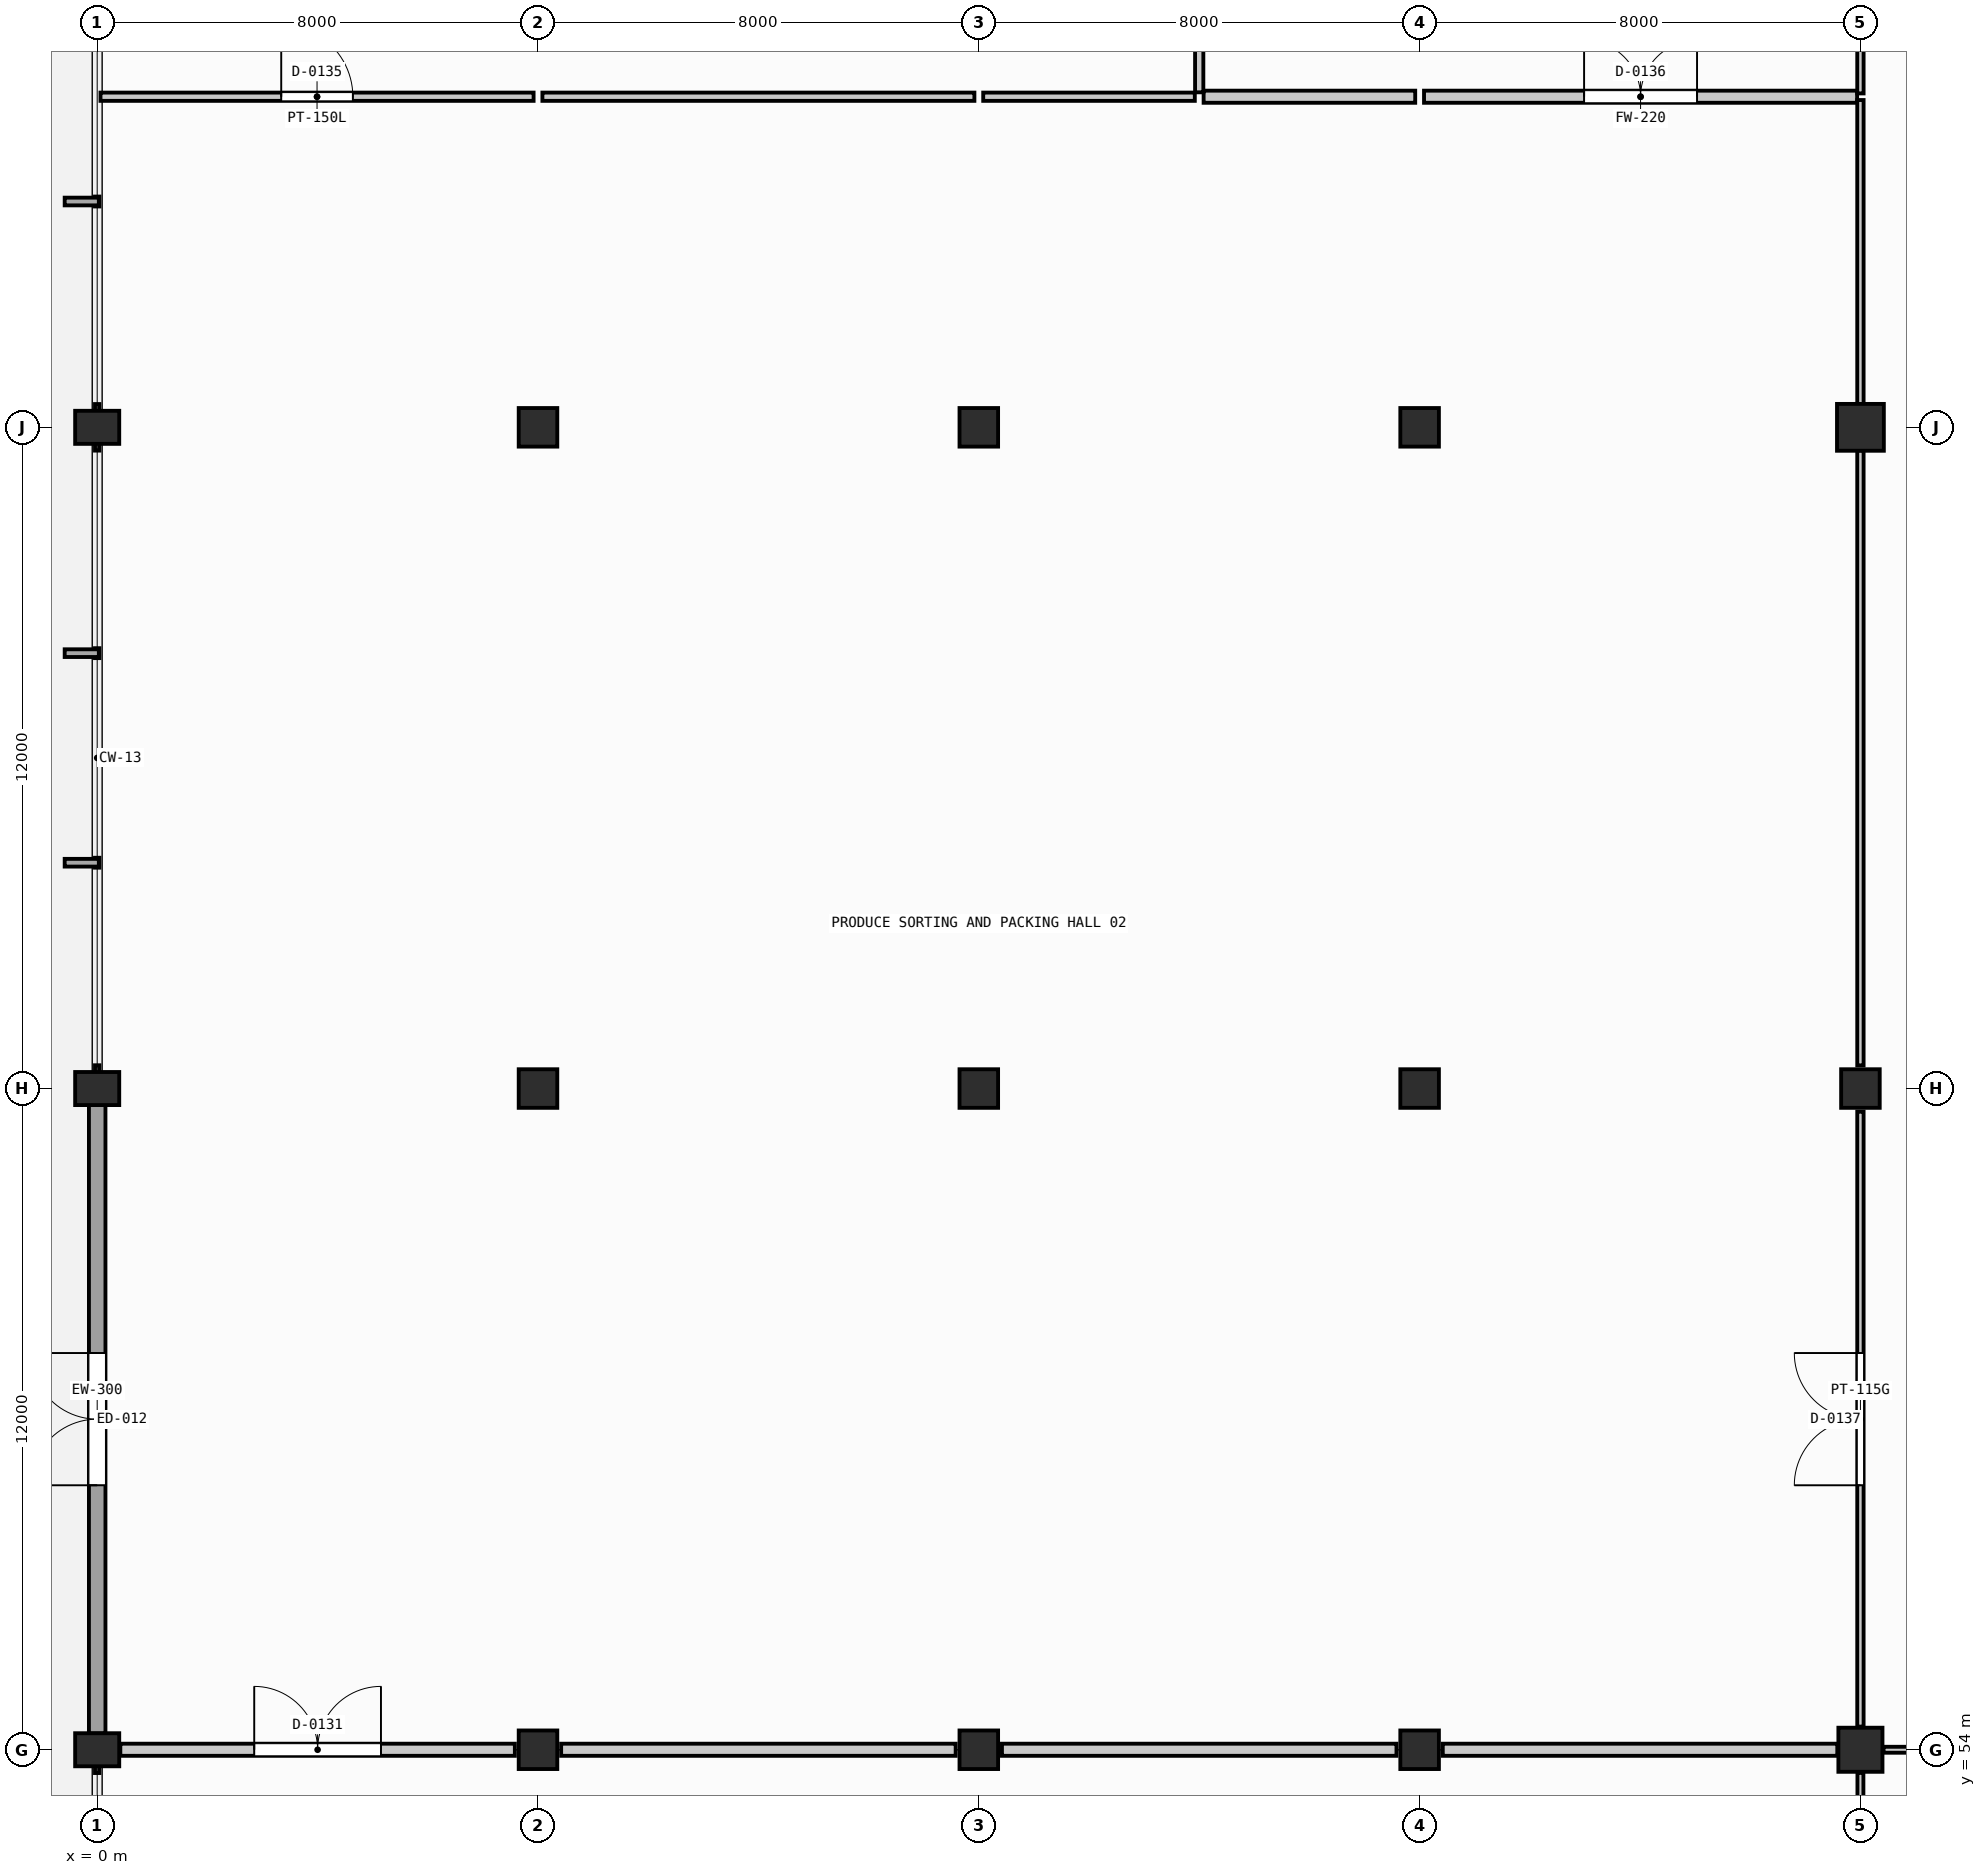
"""IFC4 building model, lengths in metres.
Left out: names, types, materials, properties, quantities, classifications, styles, units other than length and angle.
Written with IfcOpenShell. Run it as: python <this file> out.ifc"""

import sys

from ifc_helpers import new_model, si_unit, direction, frame, frame_2d, origin, origin_2d, place, context, subcontext, project, spatial, rectangle, extrude, element, fill, save


model = new_model("IFC4")
c1 = context("Model", 3, precision=1e-05, world=origin(), true_north=direction((0.0, 1.0)))
c2 = subcontext(c1, "Body", "Model", "MODEL_VIEW")
j1 = project(units=[si_unit("LENGTHUNIT", "METRE"), si_unit("PLANEANGLEUNIT", "RADIAN")], contexts=[c1])
p1 = place(None, origin())
s1 = spatial("IfcSite", under=j1, at=p1, CompositionType="ELEMENT")
p2 = place(p1, origin())
s2 = spatial("IfcBuilding", under=s1, at=p2, CompositionType="ELEMENT")
p3 = place(p2, origin())
s3 = spatial("IfcBuildingStorey", under=s2, at=p3, CompositionType="ELEMENT", Elevation=0.0)
for number, where, z_axis, x_axis in (
    (1, (0.0, 54.0, -1.25), (0.0, 0.0, 1.0), (1.0, 0.0, 0.0)),
    (2, (0.0, 66.0, -1.25), (0.0, 0.0, 1.0), (1.0, 0.0, 0.0)),
    (3, (0.0, 78.0, -1.25), (0.0, 0.0, 1.0), (1.0, 0.0, 0.0)),
):
    element("IfcColumn", number, at=place(p3, frame(where, z_axis=z_axis, x_axis=x_axis)), inside=s3, PredefinedType="COLUMN", context=c2, shape_type="SweptSolid", body=[
        extrude(rectangle(XDim=0.8, YDim=0.6, at=origin_2d()), origin(), (0.0, 0.0, 1.0), 6.05),
    ])
for number, where, z_axis, x_axis in (
    (4, (8.0, 54.0, -1.25), (0.0, 0.0, 1.0), (1.0, 0.0, 0.0)),
    (5, (8.0, 66.0, -1.25), (0.0, 0.0, 1.0), (1.0, 0.0, 0.0)),
    (6, (8.0, 78.0, -1.25), (0.0, 0.0, 1.0), (1.0, 0.0, 0.0)),
    (7, (16.0, 54.0, -1.25), (0.0, 0.0, 1.0), (1.0, 0.0, 0.0)),
    (8, (16.0, 66.0, -1.25), (0.0, 0.0, 1.0), (1.0, 0.0, 0.0)),
    (9, (16.0, 78.0, -1.25), (0.0, 0.0, 1.0), (1.0, 0.0, 0.0)),
    (10, (24.0, 54.0, -1.25), (0.0, 0.0, 1.0), (1.0, 0.0, 0.0)),
    (11, (24.0, 66.0, -1.25), (0.0, 0.0, 1.0), (1.0, 0.0, 0.0)),
    (12, (24.0, 78.0, -1.25), (0.0, 0.0, 1.0), (1.0, 0.0, 0.0)),
):
    element("IfcColumn", number, at=place(p3, frame(where, z_axis=z_axis, x_axis=x_axis)), inside=s3, PredefinedType="COLUMN", context=c2, shape_type="SweptSolid", body=[
        extrude(rectangle(XDim=0.7, YDim=0.7, at=origin_2d()), origin(), (0.0, 0.0, 1.0), 6.05),
    ])
p4 = place(p3, frame((32.0, 54.0, -1.25), z_axis=(0.0, 0.0, 1.0), x_axis=(1.0, 0.0, 0.0)))
e13 = element("IfcColumn", 13, at=p4, inside=s3, PredefinedType="COLUMN", context=c2, shape_type="SweptSolid", body=[
    extrude(rectangle(XDim=0.8, YDim=0.8, at=origin_2d()), origin(), (0.0, 0.0, 1.0), 6.05),
])
p5 = place(p3, frame((32.0, 66.0, -1.25), z_axis=(0.0, 0.0, 1.0), x_axis=(1.0, 0.0, 0.0)))
e14 = element("IfcColumn", 14, at=p5, inside=s3, PredefinedType="COLUMN", context=c2, shape_type="SweptSolid", body=[
    extrude(rectangle(XDim=0.7, YDim=0.7, at=origin_2d()), origin(), (0.0, 0.0, 1.0), 6.05),
])
p6 = place(p3, frame((32.0, 78.0, -1.25), z_axis=(0.0, 0.0, 1.0), x_axis=(1.0, 0.0, 0.0)))
e15 = element("IfcColumn", 15, at=p6, inside=s3, PredefinedType="COLUMN", context=c2, shape_type="SweptSolid", body=[
    extrude(rectangle(XDim=0.85, YDim=0.85, at=origin_2d()), origin(), (0.0, 0.0, 1.0), 6.05),
])
p7 = place(p3, frame((0.0, 65.705, 0.0), z_axis=(0.0, 0.0, 1.0), x_axis=(0.0, -1.0, 0.0)))
e16 = element("IfcWall", 16, at=p7, inside=s3, PredefinedType="SOLIDWALL", context=c2, shape_type="SweptSolid", body=[
    extrude(rectangle(XDim=11.41, YDim=0.3, at=frame_2d((5.705, 0.0))), origin(), (0.0, 0.0, 1.0), 3.65),
])
p8 = place(p7, frame((4.505, 0.0, 0.0)))
e17 = element("IfcOpeningElement", 17, at=p8, cuts=e16, PredefinedType="OPENING", context=c2, shape_type="SweptSolid", body=[
    extrude(rectangle(XDim=2.4, YDim=2.3, at=frame_2d((1.2, 1.15))), frame((0.0, 0.16, 0.0), z_axis=(0.0, -1.0, 0.0), x_axis=(1.0, 0.0, 0.0)), (0.0, 0.0, 1.0), 0.32),
])
p9 = place(p3, frame((0.42, 54.0, 0.0), z_axis=(0.0, 0.0, 1.0), x_axis=(1.0, 0.0, 0.0)))
e18 = element("IfcWall", 18, at=p9, inside=s3, PredefinedType="SOLIDWALL", context=c2, shape_type="SweptSolid", body=[
    extrude(rectangle(XDim=7.16, YDim=0.22, at=frame_2d((3.58, 0.0))), origin(), (0.0, 0.0, 1.0), 3.65),
])
p10 = place(p9, frame((2.43, 0.0, 0.0)))
e19 = element("IfcOpeningElement", 19, at=p10, cuts=e18, PredefinedType="OPENING", context=c2, shape_type="SweptSolid", body=[
    extrude(rectangle(XDim=2.3, YDim=2.5, at=frame_2d((1.15, 1.25))), frame((0.0, 0.12, 0.0), z_axis=(0.0, -1.0, 0.0), x_axis=(1.0, 0.0, 0.0)), (0.0, 0.0, 1.0), 0.24),
])
for number, where, z_axis, x_axis in (
    (20, (8.42, 54.0, 0.0), (0.0, 0.0, 1.0), (1.0, 0.0, 0.0)),
    (21, (16.42, 54.0, 0.0), (0.0, 0.0, 1.0), (1.0, 0.0, 0.0)),
    (22, (24.42, 54.0, 0.0), (0.0, 0.0, 1.0), (1.0, 0.0, 0.0)),
):
    element("IfcWall", number, at=place(p3, frame(where, z_axis=z_axis, x_axis=x_axis)), inside=s3, PredefinedType="SOLIDWALL", context=c2, shape_type="SweptSolid", body=[
        extrude(rectangle(XDim=7.16, YDim=0.22, at=frame_2d((3.58, 0.0))), origin(), (0.0, 0.0, 1.0), 3.65),
    ])
p11 = place(p3, frame((32.0, 45.42, 0.0), z_axis=(0.0, 0.0, 1.0), x_axis=(0.0, 1.0, 0.0)))
e23 = element("IfcWall", 23, at=p11, inside=s3, PredefinedType="PARTITIONING", context=c2, shape_type="SweptSolid", body=[
    extrude(rectangle(XDim=8.16, YDim=0.108, at=frame_2d((4.08, 0.0))), origin(), (0.0, 0.0, 1.0), 3.65),
])
p12 = place(p11, frame((3.005, 0.0, 0.0)))
e24 = element("IfcOpeningElement", 24, at=p12, cuts=e23, PredefinedType="OPENING", context=c2, shape_type="SweptSolid", body=[
    extrude(rectangle(XDim=2.15, YDim=2.35, at=frame_2d((1.075, 1.175))), frame((0.0, 0.064, 0.0), z_axis=(0.0, -1.0, 0.0), x_axis=(1.0, 0.0, 0.0)), (0.0, 0.0, 1.0), 0.128),
])
p13 = place(p3, frame((0.06, 84.0, 0.0), z_axis=(0.0, 0.0, 1.0), x_axis=(1.0, 0.0, 0.0)))
e25 = element("IfcWall", 25, at=p13, inside=s3, PredefinedType="PARTITIONING", context=c2, shape_type="SweptSolid", body=[
    extrude(rectangle(XDim=7.86, YDim=0.15, at=frame_2d((3.93, 0.0))), origin(), (0.0, 0.0, 1.0), 3.65),
])
p14 = place(p13, frame((3.28, 0.0, 0.0)))
e26 = element("IfcOpeningElement", 26, at=p14, cuts=e25, PredefinedType="OPENING", context=c2, shape_type="SweptSolid", body=[
    extrude(rectangle(XDim=1.3, YDim=2.15, at=frame_2d((0.65, 1.075))), frame((0.0, 0.085, 0.0), z_axis=(0.0, -1.0, 0.0), x_axis=(1.0, 0.0, 0.0)), (0.0, 0.0, 1.0), 0.17),
])
p15 = place(p3, frame((8.08, 84.0, 0.0), z_axis=(0.0, 0.0, 1.0), x_axis=(1.0, 0.0, 0.0)))
e27 = element("IfcWall", 27, at=p15, inside=s3, PredefinedType="PARTITIONING", context=c2, shape_type="SweptSolid", body=[
    extrude(rectangle(XDim=7.84, YDim=0.15, at=frame_2d((3.92, 0.0))), origin(), (0.0, 0.0, 1.0), 3.65),
])
p16 = place(p3, frame((16.08, 84.0, 0.0), z_axis=(0.0, 0.0, 1.0), x_axis=(1.0, 0.0, 0.0)))
e28 = element("IfcWall", 28, at=p16, inside=s3, PredefinedType="PARTITIONING", context=c2, shape_type="SweptSolid", body=[
    extrude(rectangle(XDim=3.84, YDim=0.15, at=frame_2d((1.92, 0.0))), origin(), (0.0, 0.0, 1.0), 3.65),
])
p17 = place(p3, frame((20.08, 84.0, 0.0), z_axis=(0.0, 0.0, 1.0), x_axis=(1.0, 0.0, 0.0)))
e29 = element("IfcWall", 29, at=p17, inside=s3, PredefinedType="SOLIDWALL", context=c2, shape_type="SweptSolid", body=[
    extrude(rectangle(XDim=3.84, YDim=0.22, at=frame_2d((1.92, 0.0))), origin(), (0.0, 0.0, 1.0), 3.65),
])
p18 = place(p3, frame((24.08, 84.0, 0.0), z_axis=(0.0, 0.0, 1.0), x_axis=(1.0, 0.0, 0.0)))
e30 = element("IfcWall", 30, at=p18, inside=s3, PredefinedType="SOLIDWALL", context=c2, shape_type="SweptSolid", body=[
    extrude(rectangle(XDim=7.86, YDim=0.22, at=frame_2d((3.93, 0.0))), origin(), (0.0, 0.0, 1.0), 3.65),
])
p19 = place(p18, frame((2.905, 0.0, 0.0)))
e31 = element("IfcOpeningElement", 31, at=p19, cuts=e30, PredefinedType="OPENING", context=c2, shape_type="SweptSolid", body=[
    extrude(rectangle(XDim=2.05, YDim=2.4, at=frame_2d((1.025, 1.2))), frame((0.0, 0.12, 0.0), z_axis=(0.0, -1.0, 0.0), x_axis=(1.0, 0.0, 0.0)), (0.0, 0.0, 1.0), 0.24),
])
p20 = place(p3, frame((32.0, 54.42, 0.0), z_axis=(0.0, 0.0, 1.0), x_axis=(0.0, 1.0, 0.0)))
e32 = element("IfcWall", 32, at=p20, inside=s3, PredefinedType="PARTITIONING", context=c2, shape_type="SweptSolid", body=[
    extrude(rectangle(XDim=11.16, YDim=0.115, at=frame_2d((5.58, 0.0))), origin(), (0.0, 0.0, 1.0), 3.65),
])
p21 = place(p20, frame((4.38, 0.0, 0.0)))
e33 = element("IfcOpeningElement", 33, at=p21, cuts=e32, PredefinedType="OPENING", context=c2, shape_type="SweptSolid", body=[
    extrude(rectangle(XDim=2.4, YDim=2.4, at=frame_2d((1.2, 1.2))), frame((0.0, 0.067, 0.0), z_axis=(0.0, -1.0, 0.0), x_axis=(1.0, 0.0, 0.0)), (0.0, 0.0, 1.0), 0.135),
])
p22 = place(p3, frame((32.0, 66.42, 0.0), z_axis=(0.0, 0.0, 1.0), x_axis=(0.0, 1.0, 0.0)))
e34 = element("IfcWall", 34, at=p22, inside=s3, PredefinedType="PARTITIONING", context=c2, shape_type="SweptSolid", body=[
    extrude(rectangle(XDim=11.16, YDim=0.115, at=frame_2d((5.58, 0.0))), origin(), (0.0, 0.0, 1.0), 3.65),
])
p23 = place(p3, frame((32.0, 78.42, 0.0), z_axis=(0.0, 0.0, 1.0), x_axis=(0.0, 1.0, 0.0)))
e35 = element("IfcWall", 35, at=p23, inside=s3, PredefinedType="PARTITIONING", context=c2, shape_type="SweptSolid", body=[
    extrude(rectangle(XDim=5.52, YDim=0.115, at=frame_2d((2.76, 0.0))), origin(), (0.0, 0.0, 1.0), 3.65),
])
p24 = place(p3, frame((20.0, 84.08, 0.0), z_axis=(0.0, 0.0, 1.0), x_axis=(0.0, 1.0, 0.0)))
e36 = element("IfcWall", 36, at=p24, inside=s3, PredefinedType="PARTITIONING", context=c2, shape_type="SweptSolid", body=[
    extrude(rectangle(XDim=5.86, YDim=0.15, at=frame_2d((2.93, 0.0))), origin(), (0.0, 0.0, 1.0), 3.65),
])
p25 = place(p24, frame((2.28, 0.0, 0.0)))
e37 = element("IfcOpeningElement", 37, at=p25, cuts=e36, PredefinedType="OPENING", context=c2, shape_type="SweptSolid", body=[
    extrude(rectangle(XDim=1.3, YDim=2.15, at=frame_2d((0.65, 1.075))), frame((0.0, 0.085, 0.0), z_axis=(0.0, -1.0, 0.0), x_axis=(1.0, 0.0, 0.0)), (0.0, 0.0, 1.0), 0.17),
])
p26 = place(p3, frame((32.0, 84.06, 0.0), z_axis=(0.0, 0.0, 1.0), x_axis=(0.0, 1.0, 0.0)))
e38 = element("IfcWall", 38, at=p26, inside=s3, PredefinedType="PARTITIONING", context=c2, shape_type="SweptSolid", body=[
    extrude(rectangle(XDim=5.52, YDim=0.115, at=frame_2d((2.76, 0.0))), origin(), (0.0, 0.0, 1.0), 3.65),
])
p27 = place(p26, frame((1.785, 0.0, 0.0)))
e39 = element("IfcOpeningElement", 39, at=p27, cuts=e38, PredefinedType="OPENING", context=c2, shape_type="SweptSolid", body=[
    extrude(rectangle(XDim=1.95, YDim=2.3, at=frame_2d((0.975, 1.15))), frame((0.0, 0.067, 0.0), z_axis=(0.0, -1.0, 0.0), x_axis=(1.0, 0.0, 0.0)), (0.0, 0.0, 1.0), 0.135),
])
p28 = place(p3, frame((32.42, 54.0, 0.0), z_axis=(0.0, 0.0, 1.0), x_axis=(1.0, 0.0, 0.0)))
e40 = element("IfcWall", 40, at=p28, inside=s3, PredefinedType="PARTITIONING", context=c2, shape_type="SweptSolid", body=[
    extrude(rectangle(XDim=7.16, YDim=0.108, at=frame_2d((3.58, 0.0))), origin(), (0.0, 0.0, 1.0), 3.65),
])
p29 = place(p28, frame((2.455, 0.0, 0.0)))
e41 = element("IfcOpeningElement", 41, at=p29, cuts=e40, PredefinedType="OPENING", context=c2, shape_type="SweptSolid", body=[
    extrude(rectangle(XDim=2.25, YDim=2.38, at=frame_2d((1.125, 1.19))), frame((0.0, 0.064, 0.0), z_axis=(0.0, -1.0, 0.0), x_axis=(1.0, 0.0, 0.0)), (0.0, 0.0, 1.0), 0.128),
])
p30 = place(p8, frame((2.4, 0.0, 0.0), z_axis=(0.0, 0.0, 1.0), x_axis=(-1.0, 0.0, 0.0)))
e42 = element("IfcDoor", 42, at=p30, inside=s3, OperationType="DOUBLE_DOOR_SINGLE_SWING", PredefinedType="DOOR", context=c2, shape_type="SweptSolid", body=[
    extrude(rectangle(XDim=2.4, YDim=2.3, at=frame_2d((1.2, 1.15))), frame((0.0, 0.025, 0.0), z_axis=(0.0, -1.0, 0.0), x_axis=(1.0, 0.0, 0.0)), (0.0, 0.0, 1.0), 0.05),
])
fill(e17, e42)
p31 = place(p10, origin())
e43 = element("IfcDoor", 43, at=p31, inside=s3, OperationType="DOUBLE_DOOR_SINGLE_SWING", PredefinedType="DOOR", context=c2, shape_type="SweptSolid", body=[
    extrude(rectangle(XDim=2.3, YDim=2.5, at=frame_2d((1.15, 1.25))), frame((0.0, 0.025, 0.0), z_axis=(0.0, -1.0, 0.0), x_axis=(1.0, 0.0, 0.0)), (0.0, 0.0, 1.0), 0.05),
])
fill(e19, e43)
p32 = place(p14, origin())
e44 = element("IfcDoor", 44, at=p32, inside=s3, OperationType="SINGLE_SWING_LEFT", PredefinedType="DOOR", context=c2, shape_type="SweptSolid", body=[
    extrude(rectangle(XDim=1.3, YDim=2.15, at=frame_2d((0.65, 1.075))), frame((0.0, 0.025, 0.0), z_axis=(0.0, -1.0, 0.0), x_axis=(1.0, 0.0, 0.0)), (0.0, 0.0, 1.0), 0.05),
])
fill(e26, e44)
p33 = place(p19, origin())
e45 = element("IfcDoor", 45, at=p33, inside=s3, OperationType="DOUBLE_DOOR_SINGLE_SWING", PredefinedType="DOOR", context=c2, shape_type="SweptSolid", body=[
    extrude(rectangle(XDim=2.05, YDim=2.4, at=frame_2d((1.025, 1.2))), frame((0.0, 0.025, 0.0), z_axis=(0.0, -1.0, 0.0), x_axis=(1.0, 0.0, 0.0)), (0.0, 0.0, 1.0), 0.05),
])
fill(e31, e45)
p34 = place(p21, origin())
e46 = element("IfcDoor", 46, at=p34, inside=s3, OperationType="DOUBLE_DOOR_SINGLE_SWING", PredefinedType="DOOR", context=c2, shape_type="SweptSolid", body=[
    extrude(rectangle(XDim=2.4, YDim=2.4, at=frame_2d((1.2, 1.2))), frame((0.0, 0.025, 0.0), z_axis=(0.0, -1.0, 0.0), x_axis=(1.0, 0.0, 0.0)), (0.0, 0.0, 1.0), 0.05),
])
fill(e33, e46)
save(model, sys.argv[1])
